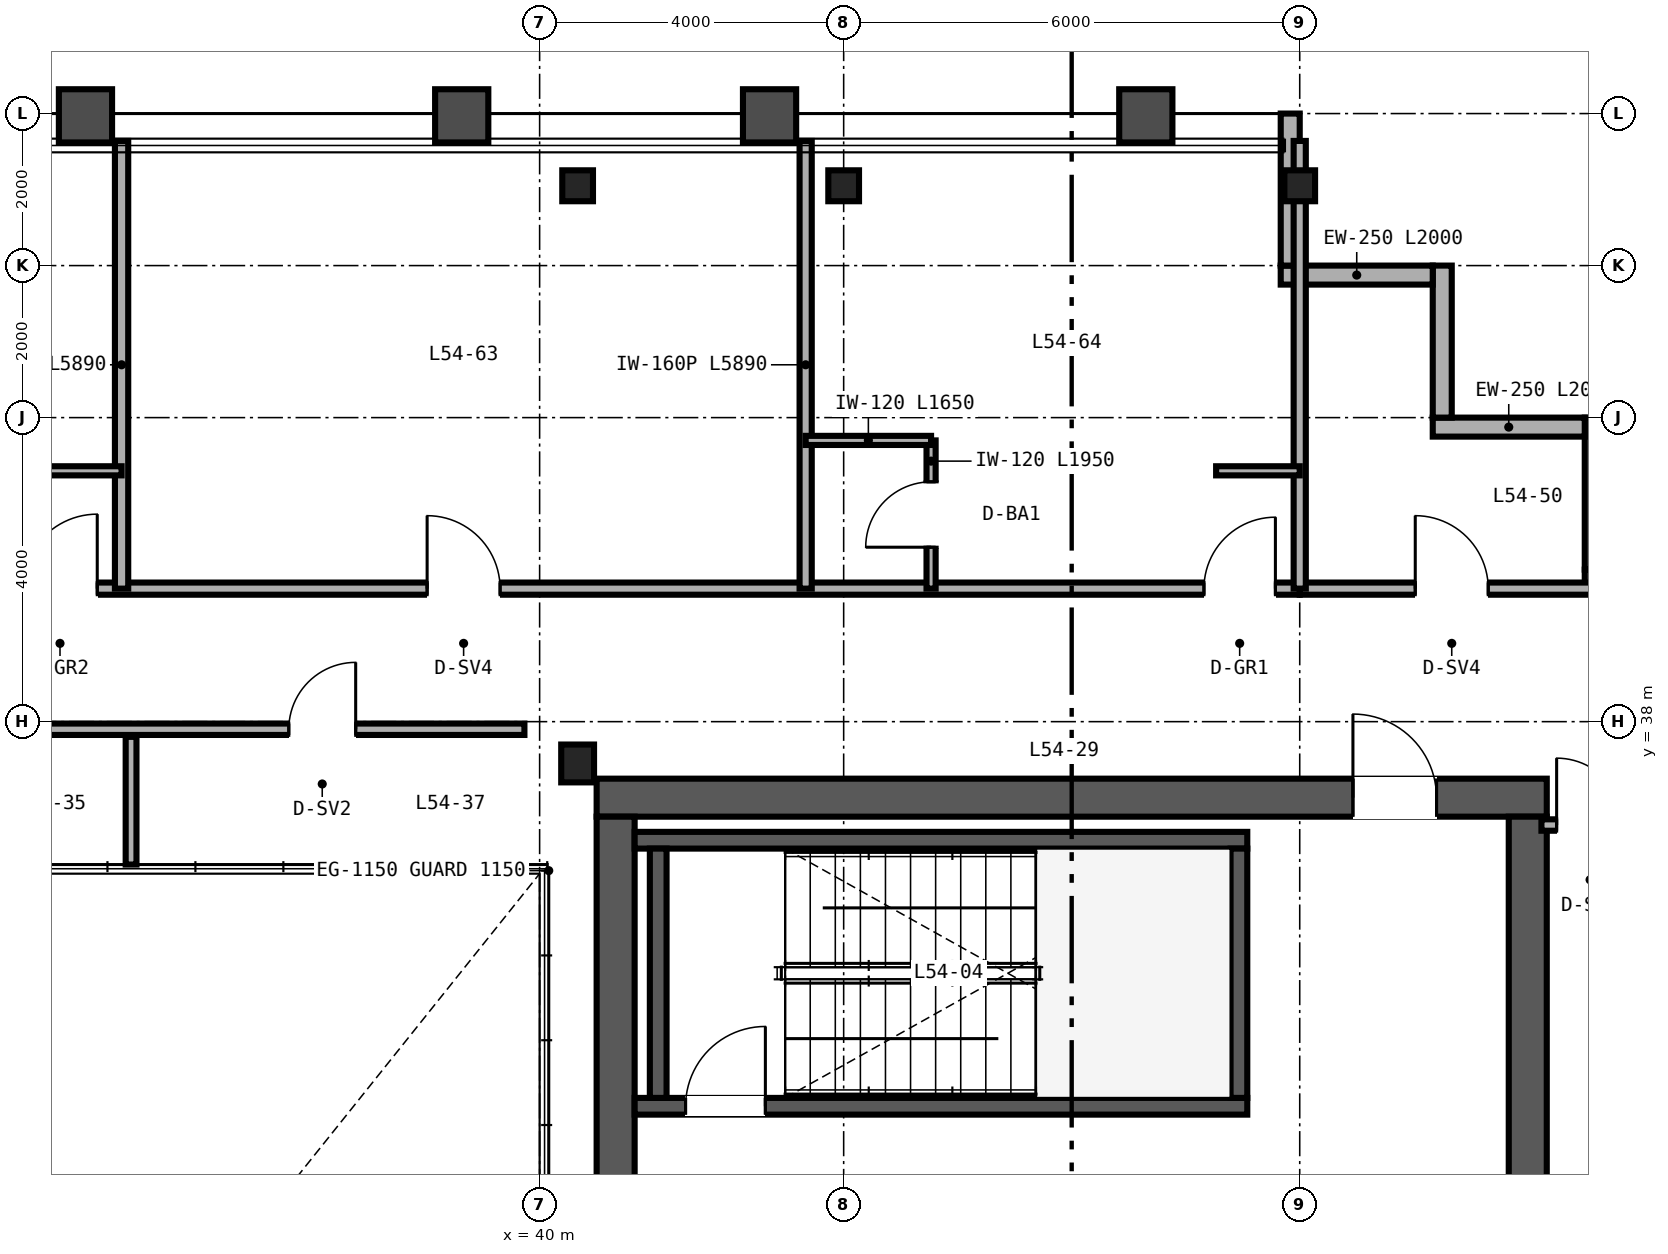
"""IFC4 building model, lengths in metres.
Left out: names, types, materials, properties, quantities, classifications, styles, units other than length and angle.
Written with IfcOpenShell. Run it as: python <this file> out.ifc"""

import sys

from ifc_helpers import new_model, si_unit, direction, frame, frame_2d, origin, origin_2d, place, context, subcontext, project, spatial, rectangle, i_section, extrude, source, transform, mapped, element, fill, save


model = new_model("IFC4")
c1 = context("Model", 3, precision=1e-05, world=origin(), true_north=direction((0.0, 1.0)))
c2 = subcontext(c1, "Body", "Model", "MODEL_VIEW")
j1 = project(units=[si_unit("LENGTHUNIT", "METRE"), si_unit("PLANEANGLEUNIT", "RADIAN")], contexts=[c1])
p1 = place(None, origin())
s1 = spatial("IfcSite", under=j1, at=p1, CompositionType="ELEMENT")
p2 = place(p1, origin())
s2 = spatial("IfcBuilding", under=s1, at=p2, CompositionType="ELEMENT")
p3 = place(p2, frame((0.0, 0.0, 213.6)))
s3 = spatial("IfcBuildingStorey", under=s2, at=p3, CompositionType="ELEMENT", Elevation=213.6)
p4 = place(p3, frame((40.75, 37.0, 0.0), z_axis=(0.0, 0.0, 1.0), x_axis=(1.0, 0.0, 0.0)))
e1 = element("IfcWall", 1, at=p4, inside=s3, PredefinedType="SHEAR", context=c2, shape_type="SweptSolid", body=[
    extrude(rectangle(XDim=12.5, YDim=0.5, at=frame_2d((6.25, 0.0))), origin(), (0.0, 0.0, 1.0), 3.37),
])
p5 = place(p4, frame((9.95, 0.0, 0.0)))
e2 = element("IfcOpeningElement", 2, at=p5, cuts=e1, PredefinedType="OPENING", context=c2, shape_type="SweptSolid", body=[
    extrude(rectangle(XDim=1.1, YDim=2.15, at=frame_2d((0.55, 1.075))), frame((0.0, 0.26, 0.0), z_axis=(0.0, -1.0, 0.0), x_axis=(1.0, 0.0, 0.0)), (0.0, 0.0, 1.0), 0.52),
])
for number, where, z_axis, x_axis in (
    (3, (41.0, 15.25, 0.0), (0.0, 0.0, 1.0), (0.0, 1.0, 0.0)),
    (4, (53.0, 15.25, 0.0), (0.0, 0.0, 1.0), (0.0, 1.0, 0.0)),
):
    element("IfcWall", number, at=place(p3, frame(where, z_axis=z_axis, x_axis=x_axis)), inside=s3, PredefinedType="SHEAR", context=c2, shape_type="SweptSolid", body=[
        extrude(rectangle(XDim=21.5, YDim=0.5, at=frame_2d((10.75, 0.0))), origin(), (0.0, 0.0, 1.0), 3.37),
    ])
p6 = place(p3, frame((41.25, 32.94, 0.0), z_axis=(0.0, 0.0, 1.0), x_axis=(1.0, 0.0, 0.0)))
e5 = element("IfcWall", 5, at=p6, inside=s3, PredefinedType="SHEAR", context=c2, shape_type="SweptSolid", body=[
    extrude(rectangle(XDim=8.06, YDim=0.22, at=frame_2d((4.03, 0.0))), origin(), (0.0, 0.0, 1.0), 3.4),
])
p7 = place(p6, frame((0.67, 0.0, 0.0)))
e6 = element("IfcOpeningElement", 6, at=p7, cuts=e5, PredefinedType="OPENING", context=c2, shape_type="SweptSolid", body=[
    extrude(rectangle(XDim=1.05, YDim=2.15, at=frame_2d((0.525, 1.075))), frame((0.0, 0.12, 0.0), z_axis=(0.0, -1.0, 0.0), x_axis=(1.0, 0.0, 0.0)), (0.0, 0.0, 1.0), 0.24),
])
p8 = place(p3, frame((41.25, 36.44, 0.0), z_axis=(0.0, 0.0, 1.0), x_axis=(1.0, 0.0, 0.0)))
e7 = element("IfcWall", 7, at=p8, inside=s3, PredefinedType="SHEAR", context=c2, shape_type="SweptSolid", body=[
    extrude(rectangle(XDim=8.06, YDim=0.22, at=frame_2d((4.03, 0.0))), origin(), (0.0, 0.0, 1.0), 3.4),
])
for number, where, z_axis, x_axis in (
    (8, (41.56, 33.05, 0.0), (0.0, 0.0, 1.0), (0.0, 1.0, 0.0)),
    (9, (49.2, 33.05, 0.0), (0.0, 0.0, 1.0), (0.0, 1.0, 0.0)),
):
    element("IfcWall", number, at=place(p3, frame(where, z_axis=z_axis, x_axis=x_axis)), inside=s3, PredefinedType="SHEAR", context=c2, shape_type="SweptSolid", body=[
        extrude(rectangle(XDim=3.28, YDim=0.22, at=frame_2d((1.64, 0.0))), origin(), (0.0, 0.0, 1.0), 3.4),
    ])
m1 = source(origin(), c2, "Body", "SweptSolid", [
    extrude(i_section(OverallWidth=0.432, OverallDepth=0.498, WebThickness=0.056, FlangeThickness=0.089, FilletRadius=0.025, at=origin_2d()), origin(), (0.0, 0.0, 1.0), 3.37),
])
p9 = place(p3, frame((40.5, 37.45, 0.0), z_axis=(0.0, 0.0, 1.0), x_axis=(1.0, 0.0, 0.0)))
e10 = element("IfcColumn", 10, at=p9, inside=s3, PredefinedType="COLUMN", context=c2, shape_type="MappedRepresentation", body=[
    mapped(m1, transform((0.0, 0.0, 0.0), scale=1.0)),
])
m2 = source(origin(), c2, "Body", "SweptSolid", [
    extrude(i_section(OverallWidth=0.404, OverallDepth=0.407, WebThickness=0.027, FlangeThickness=0.044, FilletRadius=0.025, at=origin_2d()), origin(), (0.0, 0.0, 1.0), 3.37),
])
for number, where, z_axis, x_axis in (
    (11, (40.5, 45.05, 0.0), (0.0, 0.0, 1.0), (1.0, 0.0, 0.0)),
    (12, (44.0, 45.05, 0.0), (0.0, 0.0, 1.0), (1.0, 0.0, 0.0)),
    (13, (50.0, 45.05, 0.0), (0.0, 0.0, 1.0), (1.0, 0.0, 0.0)),
):
    element("IfcColumn", number, at=place(p3, frame(where, z_axis=z_axis, x_axis=x_axis)), inside=s3, PredefinedType="COLUMN", context=c2, shape_type="MappedRepresentation", body=[
        mapped(m2, transform((0.0, 0.0, 0.0), scale=1.0)),
    ])
p10 = place(p3, frame((56.0, 39.875, 0.0), z_axis=(0.0, 0.0, 1.0), x_axis=(-1.0, 0.0, 0.0)))
e14 = element("IfcWall", 14, at=p10, inside=s3, PredefinedType="SOLIDWALL", context=c2, shape_type="SweptSolid", body=[
    extrude(rectangle(XDim=2.25, YDim=0.25, at=frame_2d((1.125, 0.0))), origin(), (0.0, 0.0, 1.0), 3.37),
])
for number, where, z_axis, x_axis in (
    (15, (53.875, 40.0, 0.0), (0.0, 0.0, 1.0), (0.0, 1.0, 0.0)),
    (16, (53.75, 41.875, 0.0), (0.0, 0.0, 1.0), (-1.0, 0.0, 0.0)),
    (17, (51.875, 42.0, 0.0), (0.0, 0.0, 1.0), (0.0, 1.0, 0.0)),
    (18, (51.75, 43.875, 0.0), (0.0, 0.0, 1.0), (-1.0, 0.0, 0.0)),
):
    element("IfcWall", number, at=place(p3, frame(where, z_axis=z_axis, x_axis=x_axis)), inside=s3, PredefinedType="SOLIDWALL", context=c2, shape_type="SweptSolid", body=[
        extrude(rectangle(XDim=2.0, YDim=0.25, at=frame_2d((1.0, 0.0))), origin(), (0.0, 0.0, 1.0), 3.37),
    ])
p11 = place(p3, frame((49.875, 44.0, 0.0), z_axis=(0.0, 0.0, 1.0), x_axis=(0.0, 1.0, 0.0)))
e19 = element("IfcWall", 19, at=p11, inside=s3, PredefinedType="SOLIDWALL", context=c2, shape_type="SweptSolid", body=[
    extrude(rectangle(XDim=2.0, YDim=0.25, at=frame_2d((1.0, 0.0))), origin(), (0.0, 0.0, 1.0), 2.677),
])
p12 = place(p3, frame((24.2, 37.9, 0.0), z_axis=(0.0, 0.0, 1.0), x_axis=(1.0, 0.0, 0.0)))
e20 = element("IfcWall", 20, at=p12, inside=s3, PredefinedType="PARTITIONING", context=c2, shape_type="SweptSolid", body=[
    extrude(rectangle(XDim=15.6, YDim=0.15, at=frame_2d((7.8, 0.0))), origin(), (0.0, 0.0, 1.0), 3.37),
])
p13 = place(p12, frame((2.0, 0.0, 0.0)))
e21 = element("IfcOpeningElement", 21, at=p13, cuts=e20, PredefinedType="OPENING", context=c2, shape_type="SweptSolid", body=[
    extrude(rectangle(XDim=0.88, YDim=2.15, at=frame_2d((0.44, 1.075))), frame((0.0, 0.085, 0.0), z_axis=(0.0, -1.0, 0.0), x_axis=(1.0, 0.0, 0.0)), (0.0, 0.0, 1.0), 0.17),
])
p14 = place(p12, frame((7.25, 0.0, 0.0)))
e22 = element("IfcOpeningElement", 22, at=p14, cuts=e20, PredefinedType="OPENING", context=c2, shape_type="SweptSolid", body=[
    extrude(rectangle(XDim=0.88, YDim=2.15, at=frame_2d((0.44, 1.075))), frame((0.0, 0.085, 0.0), z_axis=(0.0, -1.0, 0.0), x_axis=(1.0, 0.0, 0.0)), (0.0, 0.0, 1.0), 0.17),
])
p15 = place(p12, frame((12.5, 0.0, 0.0)))
e23 = element("IfcOpeningElement", 23, at=p15, cuts=e20, PredefinedType="OPENING", context=c2, shape_type="SweptSolid", body=[
    extrude(rectangle(XDim=0.88, YDim=2.15, at=frame_2d((0.44, 1.075))), frame((0.0, 0.085, 0.0), z_axis=(0.0, -1.0, 0.0), x_axis=(1.0, 0.0, 0.0)), (0.0, 0.0, 1.0), 0.17),
])
p16 = place(p3, frame((34.625, 36.12, 0.0), z_axis=(0.0, 0.0, 1.0), x_axis=(0.0, 1.0, 0.0)))
e24 = element("IfcWall", 24, at=p16, inside=s3, PredefinedType="PARTITIONING", context=c2, shape_type="SweptSolid", body=[
    extrude(rectangle(XDim=1.68, YDim=0.142, at=frame_2d((0.84, 0.0))), origin(), (0.0, 0.0, 1.0), 3.37),
])
p17 = place(p3, frame((53.18, 36.64, 0.0), z_axis=(0.0, 0.0, 1.0), x_axis=(1.0, 0.0, 0.0)))
e25 = element("IfcWall", 25, at=p17, inside=s3, PredefinedType="PARTITIONING", context=c2, shape_type="SweptSolid", body=[
    extrude(rectangle(XDim=2.66, YDim=0.15, at=frame_2d((1.33, 0.0))), origin(), (0.0, 0.0, 1.0), 2.753),
])
p18 = place(p17, frame((0.2, 0.0, 0.0)))
e26 = element("IfcOpeningElement", 26, at=p18, cuts=e25, PredefinedType="OPENING", context=c2, shape_type="SweptSolid", body=[
    extrude(rectangle(XDim=0.88, YDim=2.15, at=frame_2d((0.44, 1.075))), frame((0.0, 0.085, 0.0), z_axis=(0.0, -1.0, 0.0), x_axis=(1.0, 0.0, 0.0)), (0.0, 0.0, 1.0), 0.17),
])
p19 = place(p3, frame((50.0, 39.75, 0.0), z_axis=(0.0, 0.0, 1.0), x_axis=(1.0, 0.0, 0.0)))
e27 = element("IfcWall", 27, at=p19, inside=s3, PredefinedType="PARTITIONING", context=c2, shape_type="SweptSolid", body=[
    extrude(rectangle(XDim=4.0, YDim=0.16, at=frame_2d((2.0, 0.0))), origin(), (0.0, 0.0, 1.0), 3.37),
])
p20 = place(p19, frame((1.52, 0.0, 0.0)))
e28 = element("IfcOpeningElement", 28, at=p20, cuts=e27, PredefinedType="OPENING", context=c2, shape_type="SweptSolid", body=[
    extrude(rectangle(XDim=0.96, YDim=2.15, at=frame_2d((0.48, 1.075))), frame((0.0, 0.09, 0.0), z_axis=(0.0, -1.0, 0.0), x_axis=(1.0, 0.0, 0.0)), (0.0, 0.0, 1.0), 0.18),
])
p21 = place(p3, frame((14.0, 39.75, 0.0), z_axis=(0.0, 0.0, 1.0), x_axis=(1.0, 0.0, 0.0)))
e29 = element("IfcWall", 29, at=p21, inside=s3, PredefinedType="PARTITIONING", context=c2, shape_type="SweptSolid", body=[
    extrude(rectangle(XDim=36.0, YDim=0.16, at=frame_2d((18.0, 0.0))), origin(), (0.0, 0.0, 1.0), 2.913),
])
p22 = place(p21, frame((9.2, 0.0, 0.0)))
e30 = element("IfcOpeningElement", 30, at=p22, cuts=e29, PredefinedType="OPENING", context=c2, shape_type="SweptSolid", body=[
    extrude(rectangle(XDim=0.98, YDim=2.2, at=frame_2d((0.49, 1.1))), frame((0.0, 0.09, 0.0), z_axis=(0.0, -1.0, 0.0), x_axis=(1.0, 0.0, 0.0)), (0.0, 0.0, 1.0), 0.18),
])
p23 = place(p21, frame((19.2, 0.0, 0.0)))
e31 = element("IfcOpeningElement", 31, at=p23, cuts=e29, PredefinedType="OPENING", context=c2, shape_type="SweptSolid", body=[
    extrude(rectangle(XDim=0.98, YDim=2.2, at=frame_2d((0.49, 1.1))), frame((0.0, 0.09, 0.0), z_axis=(0.0, -1.0, 0.0), x_axis=(1.0, 0.0, 0.0)), (0.0, 0.0, 1.0), 0.18),
])
p24 = place(p21, frame((24.52, 0.0, 0.0)))
e32 = element("IfcOpeningElement", 32, at=p24, cuts=e29, PredefinedType="OPENING", context=c2, shape_type="SweptSolid", body=[
    extrude(rectangle(XDim=0.96, YDim=2.15, at=frame_2d((0.48, 1.075))), frame((0.0, 0.09, 0.0), z_axis=(0.0, -1.0, 0.0), x_axis=(1.0, 0.0, 0.0)), (0.0, 0.0, 1.0), 0.18),
])
p25 = place(p21, frame((34.74, 0.0, 0.0)))
e33 = element("IfcOpeningElement", 33, at=p25, cuts=e29, PredefinedType="OPENING", context=c2, shape_type="SweptSolid", body=[
    extrude(rectangle(XDim=0.94, YDim=2.15, at=frame_2d((0.47, 1.075))), frame((0.0, 0.09, 0.0), z_axis=(0.0, -1.0, 0.0), x_axis=(1.0, 0.0, 0.0)), (0.0, 0.0, 1.0), 0.18),
])
p26 = place(p3, frame((50.0, 39.75, 0.0), z_axis=(0.0, 0.0, 1.0), x_axis=(0.0, 1.0, 0.0)))
e34 = element("IfcWall", 34, at=p26, inside=s3, PredefinedType="PARTITIONING", context=c2, shape_type="SweptSolid", body=[
    extrude(rectangle(XDim=5.89, YDim=0.16, at=frame_2d((2.945, 0.0))), origin(), (0.0, 0.0, 1.0), 2.677),
])
p27 = place(p3, frame((34.5, 39.75, 0.0), z_axis=(0.0, 0.0, 1.0), x_axis=(0.0, 1.0, 0.0)))
e35 = element("IfcWall", 35, at=p27, inside=s3, PredefinedType="PARTITIONING", context=c2, shape_type="SweptSolid", body=[
    extrude(rectangle(XDim=5.89, YDim=0.175, at=frame_2d((2.945, 0.0))), origin(), (0.0, 0.0, 1.0), 2.443),
])
p28 = place(p3, frame((33.4, 41.3, 0.0), z_axis=(0.0, 0.0, 1.0), x_axis=(1.0, 0.0, 0.0)))
e36 = element("IfcWall", 36, at=p28, inside=s3, PredefinedType="PARTITIONING", context=c2, shape_type="SweptSolid", body=[
    extrude(rectangle(XDim=1.1, YDim=0.12, at=frame_2d((0.55, 0.0))), origin(), (0.0, 0.0, 1.0), 3.37),
])
p29 = place(p3, frame((43.5, 39.75, 0.0), z_axis=(0.0, 0.0, 1.0), x_axis=(0.0, 1.0, 0.0)))
e37 = element("IfcWall", 37, at=p29, inside=s3, PredefinedType="PARTITIONING", context=c2, shape_type="SweptSolid", body=[
    extrude(rectangle(XDim=5.89, YDim=0.16, at=frame_2d((2.945, 0.0))), origin(), (0.0, 0.0, 1.0), 2.833),
])
p30 = place(p3, frame((45.15, 39.75, 0.0), z_axis=(0.0, 0.0, 1.0), x_axis=(0.0, 1.0, 0.0)))
e38 = element("IfcWall", 38, at=p30, inside=s3, PredefinedType="PARTITIONING", context=c2, shape_type="SweptSolid", body=[
    extrude(rectangle(XDim=1.95, YDim=0.12, at=frame_2d((0.975, 0.0))), origin(), (0.0, 0.0, 1.0), 3.37),
])
p31 = place(p30, frame((0.545, 0.0, 0.0)))
e39 = element("IfcOpeningElement", 39, at=p31, cuts=e38, PredefinedType="OPENING", context=c2, shape_type="SweptSolid", body=[
    extrude(rectangle(XDim=0.86, YDim=2.1, at=frame_2d((0.43, 1.05))), frame((0.0, 0.07, 0.0), z_axis=(0.0, -1.0, 0.0), x_axis=(1.0, 0.0, 0.0)), (0.0, 0.0, 1.0), 0.14),
])
p32 = place(p3, frame((43.5, 41.7, 0.0), z_axis=(0.0, 0.0, 1.0), x_axis=(1.0, 0.0, 0.0)))
e40 = element("IfcWall", 40, at=p32, inside=s3, PredefinedType="PARTITIONING", context=c2, shape_type="SweptSolid", body=[
    extrude(rectangle(XDim=1.65, YDim=0.12, at=frame_2d((0.825, 0.0))), origin(), (0.0, 0.0, 1.0), 3.37),
])
p33 = place(p3, frame((48.9, 41.3, 0.0), z_axis=(0.0, 0.0, 1.0), x_axis=(1.0, 0.0, 0.0)))
e41 = element("IfcWall", 41, at=p33, inside=s3, PredefinedType="PARTITIONING", context=c2, shape_type="SweptSolid", body=[
    extrude(rectangle(XDim=1.1, YDim=0.12, at=frame_2d((0.55, 0.0))), origin(), (0.0, 0.0, 1.0), 3.37),
])
m3 = source(origin(), c2, "Body", "SweptSolid", [
    extrude(rectangle(XDim=1.05, YDim=2.15, at=frame_2d((0.525, 1.075))), frame((0.0, 0.025, 0.0), z_axis=(0.0, -1.0, 0.0), x_axis=(1.0, 0.0, 0.0)), (0.0, 0.0, 1.0), 0.05),
])
p34 = place(p7, origin())
e42 = element("IfcDoor", 42, at=p34, inside=s3, OperationType="SINGLE_SWING_RIGHT", PredefinedType="DOOR", context=c2, shape_type="MappedRepresentation", body=[
    mapped(m3, transform((0.0, 0.0, 0.0), scale=1.0)),
])
fill(e6, e42)
m4 = source(origin(), c2, "Body", "SweptSolid", [
    extrude(rectangle(XDim=1.1, YDim=2.15, at=frame_2d((0.55, 1.075))), frame((0.0, 0.025, 0.0), z_axis=(0.0, -1.0, 0.0), x_axis=(1.0, 0.0, 0.0)), (0.0, 0.0, 1.0), 0.05),
])
p35 = place(p5, origin())
e43 = element("IfcDoor", 43, at=p35, inside=s3, OperationType="SINGLE_SWING_LEFT", PredefinedType="DOOR", context=c2, shape_type="MappedRepresentation", body=[
    mapped(m4, transform((0.0, 0.0, 0.0), scale=1.0)),
])
fill(e2, e43)
m5 = source(origin(), c2, "Body", "SweptSolid", [
    extrude(rectangle(XDim=0.88, YDim=2.15, at=frame_2d((0.44, 1.075))), frame((0.0, 0.025, 0.0), z_axis=(0.0, -1.0, 0.0), x_axis=(1.0, 0.0, 0.0)), (0.0, 0.0, 1.0), 0.05),
])
p36 = place(p15, origin())
e44 = element("IfcDoor", 44, at=p36, inside=s3, OperationType="SINGLE_SWING_RIGHT", PredefinedType="DOOR", context=c2, shape_type="MappedRepresentation", body=[
    mapped(m5, transform((0.0, 0.0, 0.0), scale=1.0)),
])
fill(e23, e44)
p37 = place(p18, origin())
e45 = element("IfcDoor", 45, at=p37, inside=s3, OperationType="SINGLE_SWING_LEFT", PredefinedType="DOOR", context=c2, shape_type="MappedRepresentation", body=[
    mapped(m5, transform((0.0, 0.0, 0.0), scale=1.0)),
])
fill(e26, e45)
m6 = source(origin(), c2, "Body", "SweptSolid", [
    extrude(rectangle(XDim=0.96, YDim=2.15, at=frame_2d((0.48, 1.075))), frame((0.0, 0.025, 0.0), z_axis=(0.0, -1.0, 0.0), x_axis=(1.0, 0.0, 0.0)), (0.0, 0.0, 1.0), 0.05),
])
p38 = place(p20, origin())
e46 = element("IfcDoor", 46, at=p38, inside=s3, OperationType="SINGLE_SWING_LEFT", PredefinedType="DOOR", context=c2, shape_type="MappedRepresentation", body=[
    mapped(m6, transform((0.0, 0.0, 0.0), scale=1.0)),
])
fill(e28, e46)
m7 = source(origin(), c2, "Body", "SweptSolid", [
    extrude(rectangle(XDim=0.86, YDim=2.1, at=frame_2d((0.43, 1.05))), frame((0.0, 0.025, 0.0), z_axis=(0.0, -1.0, 0.0), x_axis=(1.0, 0.0, 0.0)), (0.0, 0.0, 1.0), 0.05),
])
p39 = place(p31, origin())
e47 = element("IfcDoor", 47, at=p39, inside=s3, OperationType="SINGLE_SWING_LEFT", PredefinedType="DOOR", context=c2, shape_type="MappedRepresentation", body=[
    mapped(m7, transform((0.0, 0.0, 0.0), scale=1.0)),
])
fill(e39, e47)
m8 = source(origin(), c2, "Body", "SweptSolid", [
    extrude(rectangle(XDim=0.98, YDim=2.2, at=frame_2d((0.49, 1.1))), frame((0.0, 0.025, 0.0), z_axis=(0.0, -1.0, 0.0), x_axis=(1.0, 0.0, 0.0)), (0.0, 0.0, 1.0), 0.05),
])
p40 = place(p23, origin())
e48 = element("IfcDoor", 48, at=p40, inside=s3, OperationType="SINGLE_SWING_RIGHT", PredefinedType="DOOR", context=c2, shape_type="MappedRepresentation", body=[
    mapped(m8, transform((0.0, 0.0, 0.0), scale=1.0)),
])
fill(e31, e48)
p41 = place(p24, origin())
e49 = element("IfcDoor", 49, at=p41, inside=s3, OperationType="SINGLE_SWING_LEFT", PredefinedType="DOOR", context=c2, shape_type="MappedRepresentation", body=[
    mapped(m6, transform((0.0, 0.0, 0.0), scale=1.0)),
])
fill(e32, e49)
m9 = source(origin(), c2, "Body", "SweptSolid", [
    extrude(rectangle(XDim=0.94, YDim=2.15, at=frame_2d((0.47, 1.075))), frame((0.0, 0.025, 0.0), z_axis=(0.0, -1.0, 0.0), x_axis=(1.0, 0.0, 0.0)), (0.0, 0.0, 1.0), 0.05),
])
p42 = place(p25, origin())
e50 = element("IfcDoor", 50, at=p42, inside=s3, OperationType="SINGLE_SWING_RIGHT", PredefinedType="DOOR", context=c2, shape_type="MappedRepresentation", body=[
    mapped(m9, transform((0.0, 0.0, 0.0), scale=1.0)),
])
fill(e33, e50)
save(model, sys.argv[1])
